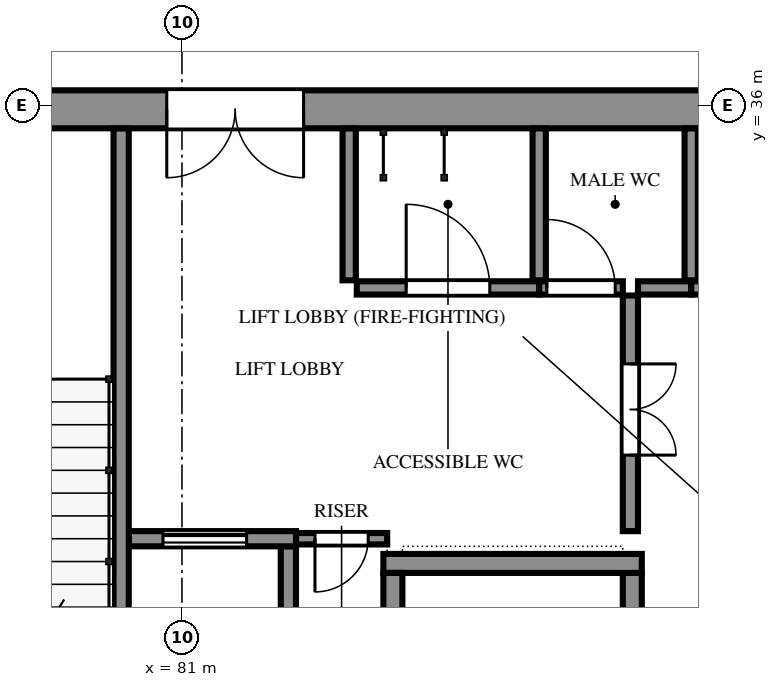
"""IFC4 building model, lengths in metres.
Left out: names, types, materials, properties, quantities, classifications, styles, units other than length and angle.
Written with IfcOpenShell. Run it as: python <this file> out.ifc"""

import sys

from ifc_helpers import new_model, si_unit, direction, frame, frame_2d, origin, place, context, subcontext, project, spatial, polyline, rectangle, outline, extrude, element, fill, save


model = new_model("IFC4")
c1 = context("Model", 3, precision=1e-05, world=origin(), true_north=direction((0.0, 1.0)))
c2 = subcontext(c1, "Body", "Model", "MODEL_VIEW")
j1 = project(units=[si_unit("LENGTHUNIT", "METRE"), si_unit("PLANEANGLEUNIT", "RADIAN")], contexts=[c1])
p1 = place(None, origin())
s1 = spatial("IfcSite", under=j1, at=p1, CompositionType="ELEMENT")
p2 = place(p1, origin())
s2 = spatial("IfcBuilding", under=s1, at=p2, CompositionType="ELEMENT")
p3 = place(p2, frame((0.0, 0.0, 11.7)))
s3 = spatial("IfcBuildingStorey", under=s2, at=p3, CompositionType="ELEMENT", Elevation=11.7)
p4 = place(p3, frame((71.8, 35.95, 0.0), z_axis=(0.0, 0.0, 1.0), x_axis=(1.0, 0.0, 0.0)))
e1 = element("IfcWall", 1, at=p4, inside=s3, PredefinedType="SOLIDWALL", context=c2, shape_type="SweptSolid", body=[
    extrude(rectangle(XDim=18.4, YDim=0.5, at=frame_2d((9.2, 0.0))), origin(), (0.0, 0.0, 1.0), 4.2),
])
p5 = place(p4, frame((1.5, 0.0, 0.0)))
e2 = element("IfcOpeningElement", 2, at=p5, cuts=e1, PredefinedType="OPENING", context=c2, shape_type="SweptSolid", body=[
    extrude(rectangle(XDim=1.8, YDim=2.1, at=frame_2d((0.9, 1.05))), frame((0.0, 0.26, 0.0), z_axis=(0.0, -1.0, 0.0), x_axis=(1.0, 0.0, 0.0)), (0.0, 0.0, 1.0), 0.52),
])
p6 = place(p4, frame((5.5, 0.0, 0.0)))
e3 = element("IfcOpeningElement", 3, at=p6, cuts=e1, PredefinedType="OPENING", context=c2, shape_type="SweptSolid", body=[
    extrude(rectangle(XDim=1.8, YDim=2.1, at=frame_2d((0.9, 1.05))), frame((0.0, 0.26, 0.0), z_axis=(0.0, -1.0, 0.0), x_axis=(1.0, 0.0, 0.0)), (0.0, 0.0, 1.0), 0.52),
])
p7 = place(p4, frame((9.0, 0.0, 0.0)))
e4 = element("IfcOpeningElement", 4, at=p7, cuts=e1, PredefinedType="OPENING", context=c2, shape_type="SweptSolid", body=[
    extrude(rectangle(XDim=1.8, YDim=2.1, at=frame_2d((0.9, 1.05))), frame((0.0, 0.26, 0.0), z_axis=(0.0, -1.0, 0.0), x_axis=(1.0, 0.0, 0.0)), (0.0, 0.0, 1.0), 0.52),
])
p8 = place(p4, frame((16.15, 0.0, 0.0)))
e5 = element("IfcOpeningElement", 5, at=p8, cuts=e1, PredefinedType="OPENING", context=c2, shape_type="SweptSolid", body=[
    extrude(rectangle(XDim=0.9, YDim=2.1, at=frame_2d((0.45, 1.05))), frame((0.0, 0.26, 0.0), z_axis=(0.0, -1.0, 0.0), x_axis=(1.0, 0.0, 0.0)), (0.0, 0.0, 1.0), 0.52),
])
p9 = place(p3, frame((80.2, 27.302, -0.15), z_axis=(0.0, 0.0, 1.0), x_axis=(0.0, 1.0, 0.0)))
e6 = element("IfcWall", 6, at=p9, inside=s3, PredefinedType="SOLIDWALL", context=c2, shape_type="SweptSolid", body=[
    extrude(rectangle(XDim=8.396, YDim=0.2, at=frame_2d((4.198, 0.0))), origin(), (0.0, 0.0, 1.0), 3.666),
])
p10 = place(p3, frame((80.302, 30.3, 0.0), z_axis=(0.0, 0.0, 1.0), x_axis=(1.0, 0.0, 0.0)))
e7 = element("IfcWall", 7, at=p10, inside=s3, PredefinedType="SOLIDWALL", context=c2, shape_type="SweptSolid", body=[
    extrude(rectangle(XDim=2.198, YDim=0.2, at=frame_2d((1.099, 0.0))), origin(), (0.0, 0.0, 1.0), 3.516),
])
p11 = place(p10, frame((0.448, 0.0, 0.0)))
e8 = element("IfcOpeningElement", 8, at=p11, cuts=e7, PredefinedType="OPENING", context=c2, shape_type="SweptSolid", body=[
    extrude(rectangle(XDim=1.1, YDim=2.1, at=frame_2d((0.55, 1.05))), frame((0.0, 0.11, 0.0), z_axis=(0.0, -1.0, 0.0), x_axis=(1.0, 0.0, 0.0)), (0.0, 0.0, 1.0), 0.22),
])
p12 = place(p3, frame((82.4, 27.302, 0.0), z_axis=(0.0, 0.0, 1.0), x_axis=(0.0, 1.0, 0.0)))
e9 = element("IfcWall", 9, at=p12, inside=s3, PredefinedType="SOLIDWALL", context=c2, shape_type="SweptSolid", body=[
    extrude(rectangle(XDim=2.898, YDim=0.2, at=frame_2d((1.449, 0.0))), origin(), (0.0, 0.0, 1.0), 3.516),
])
p13 = place(p3, frame((83.65, 29.975, 0.0), z_axis=(0.0, 0.0, 1.0), x_axis=(1.0, 0.0, 0.0)))
e10 = element("IfcWall", 10, at=p13, inside=s3, PredefinedType="SOLIDWALL", context=c2, shape_type="SweptSolid", body=[
    extrude(rectangle(XDim=3.4, YDim=0.25, at=frame_2d((1.7, 0.0))), origin(), (0.0, 0.0, 1.0), 3.516),
])
p14 = place(p3, frame((83.775, 27.65, 0.0), z_axis=(0.0, 0.0, 1.0), x_axis=(0.0, 1.0, 0.0)))
e11 = element("IfcWall", 11, at=p14, inside=s3, PredefinedType="SOLIDWALL", context=c2, shape_type="SweptSolid", body=[
    extrude(rectangle(XDim=2.2, YDim=0.25, at=frame_2d((1.1, 0.0))), origin(), (0.0, 0.0, 1.0), 3.516),
])
p15 = place(p3, frame((86.925, 27.65, 0.0), z_axis=(0.0, 0.0, 1.0), x_axis=(0.0, 1.0, 0.0)))
e12 = element("IfcWall", 12, at=p15, inside=s3, PredefinedType="SOLIDWALL", context=c2, shape_type="SweptSolid", body=[
    extrude(rectangle(XDim=2.2, YDim=0.25, at=frame_2d((1.1, 0.0))), origin(), (0.0, 0.0, 1.0), 3.516),
])
p16 = place(p15, frame((0.5, 0.0, 0.0)))
e13 = element("IfcOpeningElement", 13, at=p16, cuts=e12, PredefinedType="OPENING", context=c2, shape_type="SweptSolid", body=[
    extrude(rectangle(XDim=1.2, YDim=2.1, at=frame_2d((0.6, 1.05))), frame((0.0, 0.135, 0.0), z_axis=(0.0, -1.0, 0.0), x_axis=(1.0, 0.0, 0.0)), (0.0, 0.0, 1.0), 0.27),
])
p17 = place(p3, frame((83.7, 30.3, 0.0), z_axis=(0.0, 0.0, 1.0), x_axis=(-1.0, 0.0, 0.0)))
e14 = element("IfcWall", 14, at=p17, inside=s3, PredefinedType="SOLIDWALL", context=c2, shape_type="SweptSolid", body=[
    extrude(rectangle(XDim=1.198, YDim=0.15, at=frame_2d((0.599, 0.0))), origin(), (0.0, 0.0, 1.0), 3.516),
])
p18 = place(p17, frame((0.25, 0.0, 0.0)))
e15 = element("IfcOpeningElement", 15, at=p18, cuts=e14, PredefinedType="OPENING", context=c2, shape_type="SweptSolid", body=[
    extrude(rectangle(XDim=0.7, YDim=2.0, at=frame_2d((0.35, 1.0))), frame((0.0, 0.085, 0.0), z_axis=(0.0, -1.0, 0.0), x_axis=(1.0, 0.0, 0.0)), (0.0, 0.0, 1.0), 0.17),
])
p19 = place(p3, frame((86.9, 33.5, 0.0), z_axis=(0.0, 0.0, 1.0), x_axis=(0.0, -1.0, 0.0)))
e16 = element("IfcWall", 16, at=p19, inside=s3, PredefinedType="PARTITIONING", context=c2, shape_type="SweptSolid", body=[
    extrude(rectangle(XDim=3.1, YDim=0.2, at=frame_2d((1.55, 0.0))), origin(), (0.0, 0.0, 1.0), 3.382),
])
p20 = place(p19, frame((0.9, 0.0, 0.0)))
e17 = element("IfcOpeningElement", 17, at=p20, cuts=e16, PredefinedType="OPENING", context=c2, shape_type="SweptSolid", body=[
    extrude(rectangle(XDim=1.2, YDim=2.1, at=frame_2d((0.6, 1.05))), frame((0.0, 0.11, 0.0), z_axis=(0.0, -1.0, 0.0), x_axis=(1.0, 0.0, 0.0)), (0.0, 0.0, 1.0), 0.22),
])
p21 = place(p3, frame((83.2, 35.698, 0.0), z_axis=(0.0, 0.0, 1.0), x_axis=(0.0, -1.0, 0.0)))
e18 = element("IfcWall", 18, at=p21, inside=s3, PredefinedType="PARTITIONING", context=c2, shape_type="SweptSolid", body=[
    extrude(rectangle(XDim=1.998, YDim=0.175, at=frame_2d((0.999, 0.0))), origin(), (0.0, 0.0, 1.0), 3.307),
])
p22 = place(p3, frame((83.3, 33.6, 0.0), z_axis=(0.0, 0.0, 1.0), x_axis=(1.0, 0.0, 0.0)))
e19 = element("IfcWall", 19, at=p22, inside=s3, PredefinedType="PARTITIONING", context=c2, shape_type="SweptSolid", body=[
    extrude(rectangle(XDim=2.4, YDim=0.175, at=frame_2d((1.2, 0.0))), origin(), (0.0, 0.0, 1.0), 3.307),
])
p23 = place(p22, frame((0.65, 0.0, 0.0)))
e20 = element("IfcOpeningElement", 20, at=p23, cuts=e19, PredefinedType="OPENING", context=c2, shape_type="SweptSolid", body=[
    extrude(rectangle(XDim=1.1, YDim=2.1, at=frame_2d((0.55, 1.05))), frame((0.0, 0.097, 0.0), z_axis=(0.0, -1.0, 0.0), x_axis=(1.0, 0.0, 0.0)), (0.0, 0.0, 1.0), 0.195),
])
p24 = place(p3, frame((85.7, 33.6, 0.0), z_axis=(0.0, 0.0, 1.0), x_axis=(1.0, 0.0, 0.0)))
e21 = element("IfcWall", 21, at=p24, inside=s3, PredefinedType="PARTITIONING", context=c2, shape_type="SweptSolid", body=[
    extrude(rectangle(XDim=1.1, YDim=0.175, at=frame_2d((0.55, 0.0))), origin(), (0.0, 0.0, 1.0), 3.307),
])
p25 = place(p24, frame((0.1, 0.0, 0.0)))
e22 = element("IfcOpeningElement", 22, at=p25, cuts=e21, PredefinedType="OPENING", context=c2, shape_type="SweptSolid", body=[
    extrude(rectangle(XDim=0.9, YDim=2.1, at=frame_2d((0.45, 1.05))), frame((0.0, 0.097, 0.0), z_axis=(0.0, -1.0, 0.0), x_axis=(1.0, 0.0, 0.0)), (0.0, 0.0, 1.0), 0.195),
])
p26 = place(p3, frame((87.0, 33.6, 0.0), z_axis=(0.0, 0.0, 1.0), x_axis=(1.0, 0.0, 0.0)))
e23 = element("IfcWall", 23, at=p26, inside=s3, PredefinedType="PARTITIONING", context=c2, shape_type="SweptSolid", body=[
    extrude(rectangle(XDim=0.7, YDim=0.175, at=frame_2d((0.35, 0.0))), origin(), (0.0, 0.0, 1.0), 3.307),
])
for number, where, z_axis, x_axis in (
    (24, (87.7, 33.6, 0.0), (0.0, 0.0, 1.0), (1.0, 0.0, 0.0)),
    (25, (85.7, 35.698, 0.0), (0.0, 0.0, 1.0), (0.0, -1.0, 0.0)),
    (26, (87.7, 35.698, 0.0), (0.0, 0.0, 1.0), (0.0, -1.0, 0.0)),
):
    element("IfcWall", number, at=place(p3, frame(where, z_axis=z_axis, x_axis=x_axis)), inside=s3, PredefinedType="PARTITIONING", context=c2, shape_type="SweptSolid", body=[
        extrude(rectangle(XDim=1.998, YDim=0.175, at=frame_2d((0.999, 0.0))), origin(), (0.0, 0.0, 1.0), 3.307),
    ])
p27 = place(p11, origin())
e27 = element("IfcDoor", 27, at=p27, inside=s3, OperationType="SLIDING_TO_LEFT", PredefinedType="DOOR", context=c2, shape_type="SweptSolid", body=[
    extrude(outline(polyline([(0.0, 0.0), (0.07, 0.0), (0.07, 2.03), (1.03, 2.03), (1.03, 0.0), (1.1, 0.0), (1.1, 2.1), (0.0, 2.1), (0.0, 0.0)])), frame((0.0, 0.025, 0.0), z_axis=(0.0, -1.0, 0.0), x_axis=(1.0, 0.0, 0.0)), (0.0, 0.0, 1.0), 0.05),
    extrude(rectangle(XDim=0.524, YDim=2.016, at=frame_2d((0.336, 1.018))), frame((0.0, 0.018, 0.0), z_axis=(0.0, -1.0, 0.0), x_axis=(1.0, 0.0, 0.0)), (0.0, 0.0, 1.0), 0.016),
    extrude(rectangle(XDim=0.52, YDim=2.016, at=frame_2d((0.766, 1.018))), frame((0.0, -0.002, 0.0), z_axis=(0.0, -1.0, 0.0), x_axis=(1.0, 0.0, 0.0)), (0.0, 0.0, 1.0), 0.016),
])
fill(e8, e27)
p28 = place(p7, frame((1.8, 0.0, 0.0), z_axis=(0.0, 0.0, 1.0), x_axis=(-1.0, 0.0, 0.0)))
e28 = element("IfcDoor", 28, at=p28, inside=s3, OperationType="DOUBLE_DOOR_SINGLE_SWING", PredefinedType="DOOR", context=c2, shape_type="SweptSolid", body=[
    extrude(outline(polyline([(0.0, 0.0), (0.07, 0.0), (0.07, 2.03), (1.73, 2.03), (1.73, 0.0), (1.8, 0.0), (1.8, 2.1), (0.0, 2.1), (0.0, 0.0)])), frame((0.0, 0.025, 0.0), z_axis=(0.0, -1.0, 0.0), x_axis=(1.0, 0.0, 0.0)), (0.0, 0.0, 1.0), 0.05),
    extrude(outline(polyline([(0.074, 0.01), (0.897, 0.01), (0.897, 2.026), (0.074, 2.026), (0.074, 0.01)]), holes=[polyline([(0.194, 0.16), (0.777, 0.16), (0.777, 1.01), (0.194, 1.01), (0.194, 0.16)]), polyline([(0.335, 1.16), (0.635, 1.16), (0.635, 1.76), (0.335, 1.76), (0.335, 1.16)])]), frame((0.0, 0.017, 0.0), z_axis=(0.0, -1.0, 0.0), x_axis=(1.0, 0.0, 0.0)), (0.0, 0.0, 1.0), 0.035),
    extrude(rectangle(XDim=0.583, YDim=0.85, at=frame_2d((0.485, 0.585))), frame((0.0, 0.009, 0.0), z_axis=(0.0, -1.0, 0.0), x_axis=(1.0, 0.0, 0.0)), (0.0, 0.0, 1.0), 0.017),
    extrude(rectangle(XDim=0.3, YDim=0.6, at=frame_2d((0.485, 1.46))), frame((0.0, 0.006, 0.0), z_axis=(0.0, -1.0, 0.0), x_axis=(1.0, 0.0, 0.0)), (0.0, 0.0, 1.0), 0.012),
    extrude(outline(polyline([(0.903, 0.01), (1.726, 0.01), (1.726, 2.026), (0.903, 2.026), (0.903, 0.01)]), holes=[polyline([(1.023, 0.16), (1.606, 0.16), (1.606, 1.01), (1.023, 1.01), (1.023, 0.16)]), polyline([(1.165, 1.16), (1.465, 1.16), (1.465, 1.76), (1.165, 1.76), (1.165, 1.16)])]), frame((0.0, 0.017, 0.0), z_axis=(0.0, -1.0, 0.0), x_axis=(1.0, 0.0, 0.0)), (0.0, 0.0, 1.0), 0.035),
    extrude(rectangle(XDim=0.583, YDim=0.85, at=frame_2d((1.314, 0.585))), frame((0.0, 0.009, 0.0), z_axis=(0.0, -1.0, 0.0), x_axis=(1.0, 0.0, 0.0)), (0.0, 0.0, 1.0), 0.017),
    extrude(rectangle(XDim=0.3, YDim=0.6, at=frame_2d((1.314, 1.46))), frame((0.0, 0.006, 0.0), z_axis=(0.0, -1.0, 0.0), x_axis=(1.0, 0.0, 0.0)), (0.0, 0.0, 1.0), 0.012),
])
fill(e4, e28)
p29 = place(p20, origin())
e29 = element("IfcDoor", 29, at=p29, inside=s3, OperationType="DOUBLE_DOOR_SINGLE_SWING", PredefinedType="DOOR", context=c2, shape_type="SweptSolid", body=[
    extrude(outline(polyline([(0.0, 0.0), (0.07, 0.0), (0.07, 2.03), (1.13, 2.03), (1.13, 0.0), (1.2, 0.0), (1.2, 2.1), (0.0, 2.1), (0.0, 0.0)])), frame((0.0, 0.025, 0.0), z_axis=(0.0, -1.0, 0.0), x_axis=(1.0, 0.0, 0.0)), (0.0, 0.0, 1.0), 0.05),
    extrude(outline(polyline([(0.074, 0.01), (0.597, 0.01), (0.597, 2.026), (0.074, 2.026), (0.074, 0.01)]), holes=[polyline([(0.178, 0.373), (0.492, 0.373), (0.492, 1.784), (0.178, 1.784), (0.178, 0.373)])]), frame((0.0, 0.017, 0.0), z_axis=(0.0, -1.0, 0.0), x_axis=(1.0, 0.0, 0.0)), (0.0, 0.0, 1.0), 0.035),
    extrude(rectangle(XDim=0.314, YDim=1.411, at=frame_2d((0.335, 1.079))), frame((0.0, 0.009, 0.0), z_axis=(0.0, -1.0, 0.0), x_axis=(1.0, 0.0, 0.0)), (0.0, 0.0, 1.0), 0.017),
    extrude(outline(polyline([(0.603, 0.01), (1.126, 0.01), (1.126, 2.026), (0.603, 2.026), (0.603, 0.01)]), holes=[polyline([(0.708, 0.373), (1.021, 0.373), (1.021, 1.784), (0.708, 1.784), (0.708, 0.373)])]), frame((0.0, 0.017, 0.0), z_axis=(0.0, -1.0, 0.0), x_axis=(1.0, 0.0, 0.0)), (0.0, 0.0, 1.0), 0.035),
    extrude(rectangle(XDim=0.314, YDim=1.411, at=frame_2d((0.865, 1.079))), frame((0.0, 0.009, 0.0), z_axis=(0.0, -1.0, 0.0), x_axis=(1.0, 0.0, 0.0)), (0.0, 0.0, 1.0), 0.017),
])
fill(e17, e29)
p30 = place(p18, origin())
e30 = element("IfcDoor", 30, at=p30, inside=s3, OperationType="SINGLE_SWING_RIGHT", PredefinedType="DOOR", context=c2, shape_type="SweptSolid", body=[
    extrude(outline(polyline([(0.0, 0.0), (0.07, 0.0), (0.07, 1.93), (0.63, 1.93), (0.63, 0.0), (0.7, 0.0), (0.7, 2.0), (0.0, 2.0), (0.0, 0.0)])), frame((0.0, 0.025, 0.0), z_axis=(0.0, -1.0, 0.0), x_axis=(1.0, 0.0, 0.0)), (0.0, 0.0, 1.0), 0.05),
    extrude(outline(polyline([(0.074, 0.01), (0.626, 0.01), (0.626, 1.926), (0.074, 1.926), (0.074, 0.01)]), holes=[polyline([(0.184, 0.16), (0.516, 0.16), (0.516, 1.01), (0.184, 1.01), (0.184, 0.16)]), polyline([(0.2, 1.16), (0.5, 1.16), (0.5, 1.76), (0.2, 1.76), (0.2, 1.16)])]), frame((0.0, 0.017, 0.0), z_axis=(0.0, -1.0, 0.0), x_axis=(1.0, 0.0, 0.0)), (0.0, 0.0, 1.0), 0.035),
    extrude(rectangle(XDim=0.331, YDim=0.85, at=frame_2d((0.35, 0.585))), frame((0.0, 0.009, 0.0), z_axis=(0.0, -1.0, 0.0), x_axis=(1.0, 0.0, 0.0)), (0.0, 0.0, 1.0), 0.017),
    extrude(rectangle(XDim=0.3, YDim=0.6, at=frame_2d((0.35, 1.46))), frame((0.0, 0.006, 0.0), z_axis=(0.0, -1.0, 0.0), x_axis=(1.0, 0.0, 0.0)), (0.0, 0.0, 1.0), 0.012),
])
fill(e15, e30)
p31 = place(p23, origin())
e31 = element("IfcDoor", 31, at=p31, inside=s3, OperationType="SINGLE_SWING_LEFT", PredefinedType="DOOR", context=c2, shape_type="SweptSolid", body=[
    extrude(outline(polyline([(0.0, 0.0), (0.07, 0.0), (0.07, 2.03), (1.03, 2.03), (1.03, 0.0), (1.1, 0.0), (1.1, 2.1), (0.0, 2.1), (0.0, 0.0)])), frame((0.0, 0.025, 0.0), z_axis=(0.0, -1.0, 0.0), x_axis=(1.0, 0.0, 0.0)), (0.0, 0.0, 1.0), 0.05),
    extrude(outline(polyline([(0.074, 0.01), (1.026, 0.01), (1.026, 2.026), (0.074, 2.026), (0.074, 0.01)]), holes=[polyline([(0.194, 0.16), (0.906, 0.16), (0.906, 1.01), (0.194, 1.01), (0.194, 0.16)]), polyline([(0.4, 1.16), (0.7, 1.16), (0.7, 1.76), (0.4, 1.76), (0.4, 1.16)])]), frame((0.0, 0.017, 0.0), z_axis=(0.0, -1.0, 0.0), x_axis=(1.0, 0.0, 0.0)), (0.0, 0.0, 1.0), 0.035),
    extrude(rectangle(XDim=0.712, YDim=0.85, at=frame_2d((0.55, 0.585))), frame((0.0, 0.009, 0.0), z_axis=(0.0, -1.0, 0.0), x_axis=(1.0, 0.0, 0.0)), (0.0, 0.0, 1.0), 0.017),
    extrude(rectangle(XDim=0.3, YDim=0.6, at=frame_2d((0.55, 1.46))), frame((0.0, 0.006, 0.0), z_axis=(0.0, -1.0, 0.0), x_axis=(1.0, 0.0, 0.0)), (0.0, 0.0, 1.0), 0.012),
])
fill(e20, e31)
p32 = place(p25, origin())
e32 = element("IfcDoor", 32, at=p32, inside=s3, OperationType="SINGLE_SWING_LEFT", PredefinedType="DOOR", context=c2, shape_type="SweptSolid", body=[
    extrude(outline(polyline([(0.0, 0.0), (0.07, 0.0), (0.07, 2.03), (0.83, 2.03), (0.83, 0.0), (0.9, 0.0), (0.9, 2.1), (0.0, 2.1), (0.0, 0.0)])), frame((0.0, 0.025, 0.0), z_axis=(0.0, -1.0, 0.0), x_axis=(1.0, 0.0, 0.0)), (0.0, 0.0, 1.0), 0.05),
    extrude(outline(polyline([(0.074, 0.01), (0.826, 0.01), (0.826, 2.026), (0.074, 2.026), (0.074, 0.01)]), holes=[polyline([(0.194, 0.16), (0.706, 0.16), (0.706, 1.01), (0.194, 1.01), (0.194, 0.16)]), polyline([(0.3, 1.16), (0.6, 1.16), (0.6, 1.76), (0.3, 1.76), (0.3, 1.16)])]), frame((0.0, 0.017, 0.0), z_axis=(0.0, -1.0, 0.0), x_axis=(1.0, 0.0, 0.0)), (0.0, 0.0, 1.0), 0.035),
    extrude(rectangle(XDim=0.512, YDim=0.85, at=frame_2d((0.45, 0.585))), frame((0.0, 0.009, 0.0), z_axis=(0.0, -1.0, 0.0), x_axis=(1.0, 0.0, 0.0)), (0.0, 0.0, 1.0), 0.017),
    extrude(rectangle(XDim=0.3, YDim=0.6, at=frame_2d((0.45, 1.46))), frame((0.0, 0.006, 0.0), z_axis=(0.0, -1.0, 0.0), x_axis=(1.0, 0.0, 0.0)), (0.0, 0.0, 1.0), 0.012),
])
fill(e22, e32)
save(model, sys.argv[1])
